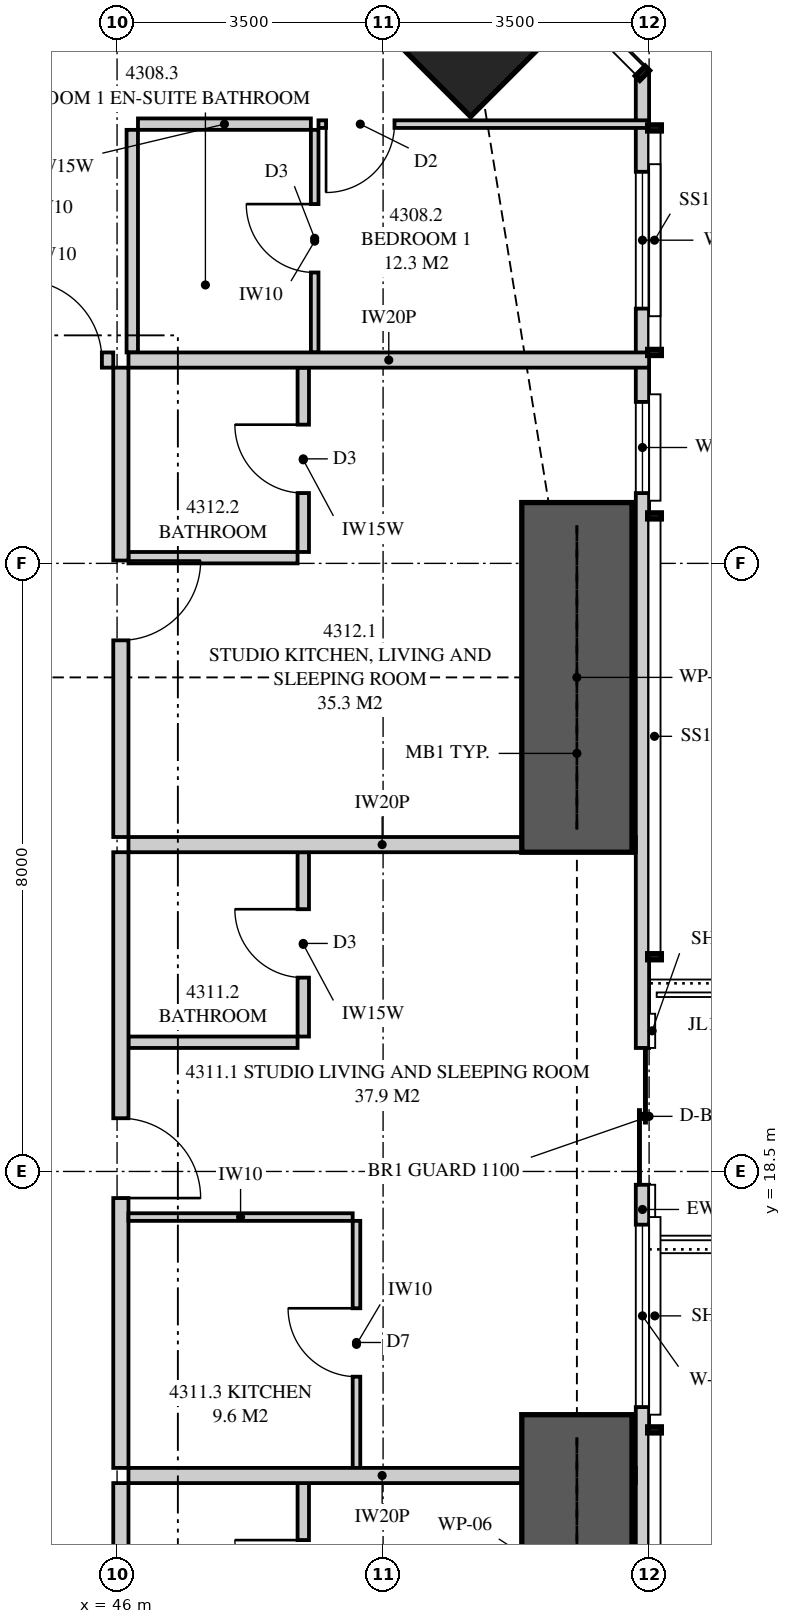
"""IFC4 building model, lengths in metres.
Left out: names, types, materials, properties, quantities, classifications, styles, units other than length and angle.
Written with IfcOpenShell. Run it as: python <this file> out.ifc"""

import sys

from ifc_helpers import new_model, si_unit, direction, frame, frame_2d, origin, origin_2d, place, context, subcontext, project, spatial, polyline, rectangle, outline, extrude, element, fill, save


model = new_model("IFC4")
c1 = context("Model", 3, precision=1e-05, world=origin(), true_north=direction((0.0, 1.0)))
c2 = subcontext(c1, "Body", "Model", "MODEL_VIEW")
j1 = project(units=[si_unit("LENGTHUNIT", "METRE"), si_unit("PLANEANGLEUNIT", "RADIAN")], contexts=[c1])
p1 = place(None, origin())
s1 = spatial("IfcSite", under=j1, at=p1, CompositionType="ELEMENT")
p2 = place(p1, origin())
s2 = spatial("IfcBuilding", under=s1, at=p2, CompositionType="ELEMENT")
p3 = place(p2, frame((0.0, 0.0, 161.05)))
s3 = spatial("IfcBuildingStorey", under=s2, at=p3, CompositionType="ELEMENT", Elevation=161.05)
p4 = place(p3, frame((50.652, 33.652, 0.0), z_axis=(0.0, 0.0, 1.0), x_axis=(0.707106781187, 0.707106781187, 0.0)))
e1 = element("IfcColumn", 1, at=p4, inside=s3, PredefinedType="COLUMN", context=c2, shape_type="SweptSolid", body=[
    extrude(rectangle(XDim=1.8, YDim=1.8, at=origin_2d()), origin(), (0.0, 0.0, 1.0), 3.35),
])
p5 = place(p3, frame((52.913, 3.051, 0.0), z_axis=(0.0, 0.0, 1.0), x_axis=(0.0, 1.0, 0.0)))
e2 = element("IfcWall", 2, at=p5, inside=s3, PredefinedType="SOLIDWALL", context=c2, shape_type="SweptSolid", body=[
    extrude(outline(polyline([(0.0, 0.0), (29.897, 0.0), (29.897, 3.11), (22.167, 3.11), (22.167, 2.15), (22.074, 2.15), (22.074, 3.11), (21.949, 3.11), (21.949, 2.15), (9.949, 2.15), (9.949, 3.11), (9.847, 3.11), (9.847, 2.15), (9.706, 2.15), (9.706, 3.11), (0.0, 3.11), (0.0, 0.0)])), frame((0.0, 0.087, 0.0), z_axis=(0.0, -1.0, 0.0), x_axis=(1.0, 0.0, 0.0)), (0.0, 0.0, 1.0), 0.175),
])
p6 = place(p5, frame((1.797, 0.0, 0.4)))
e3 = element("IfcOpeningElement", 3, at=p6, cuts=e2, PredefinedType="OPENING", context=c2, shape_type="SweptSolid", body=[
    extrude(rectangle(XDim=1.8, YDim=1.7, at=frame_2d((0.9, 0.85))), frame((0.0, 0.097, 0.0), z_axis=(0.0, -1.0, 0.0), x_axis=(1.0, 0.0, 0.0)), (0.0, 0.0, 1.0), 0.195),
])
p7 = place(p5, frame((5.149, 0.0, 0.4)))
e4 = element("IfcOpeningElement", 4, at=p7, cuts=e2, PredefinedType="OPENING", context=c2, shape_type="SweptSolid", body=[
    extrude(rectangle(XDim=2.4, YDim=1.7, at=frame_2d((1.2, 0.85))), frame((0.0, 0.097, 0.0), z_axis=(0.0, -1.0, 0.0), x_axis=(1.0, 0.0, 0.0)), (0.0, 0.0, 1.0), 0.195),
])
p8 = place(p5, frame((15.274, 0.0, 0.0)))
e5 = element("IfcOpeningElement", 5, at=p8, cuts=e2, PredefinedType="OPENING", context=c2, shape_type="SweptSolid", body=[
    extrude(rectangle(XDim=1.8, YDim=2.1, at=frame_2d((0.9, 1.05))), frame((0.0, 0.097, 0.0), z_axis=(0.0, -1.0, 0.0), x_axis=(1.0, 0.0, 0.0)), (0.0, 0.0, 1.0), 0.195),
])
p9 = place(p5, frame((12.349, 0.0, 0.4)))
e6 = element("IfcOpeningElement", 6, at=p9, cuts=e2, PredefinedType="OPENING", context=c2, shape_type="SweptSolid", body=[
    extrude(rectangle(XDim=2.4, YDim=1.7, at=frame_2d((1.2, 0.85))), frame((0.0, 0.097, 0.0), z_axis=(0.0, -1.0, 0.0), x_axis=(1.0, 0.0, 0.0)), (0.0, 0.0, 1.0), 0.195),
])
p10 = place(p5, frame((24.373, 0.0, 0.4)))
e7 = element("IfcOpeningElement", 7, at=p10, cuts=e2, PredefinedType="OPENING", context=c2, shape_type="SweptSolid", body=[
    extrude(rectangle(XDim=1.2, YDim=1.7, at=frame_2d((0.6, 0.85))), frame((0.0, 0.097, 0.0), z_axis=(0.0, -1.0, 0.0), x_axis=(1.0, 0.0, 0.0)), (0.0, 0.0, 1.0), 0.195),
])
p11 = place(p5, frame((26.801, 0.0, 0.4)))
e8 = element("IfcOpeningElement", 8, at=p11, cuts=e2, PredefinedType="OPENING", context=c2, shape_type="SweptSolid", body=[
    extrude(rectangle(XDim=1.8, YDim=1.7, at=frame_2d((0.9, 0.85))), frame((0.0, 0.097, 0.0), z_axis=(0.0, -1.0, 0.0), x_axis=(1.0, 0.0, 0.0)), (0.0, 0.0, 1.0), 0.195),
])
p12 = place(p3, frame((42.05, 29.175, 0.0), z_axis=(0.0, 0.0, 1.0), x_axis=(1.0, 0.0, 0.0)))
e9 = element("IfcWall", 9, at=p12, inside=s3, PredefinedType="PARTITIONING", context=c2, shape_type="SweptSolid", body=[
    extrude(outline(polyline([(0.0, 0.0), (3.9, 0.0), (3.9, 3.11), (1.037, 3.11), (1.037, 2.541), (0.363, 2.541), (0.363, 3.11), (0.0, 3.11), (0.0, 0.0)])), frame((0.0, 0.1, 0.0), z_axis=(0.0, -1.0, 0.0), x_axis=(1.0, 0.0, 0.0)), (0.0, 0.0, 1.0), 0.2),
])
p13 = place(p12, frame((2.7, 0.0, 0.0)))
e10 = element("IfcOpeningElement", 10, at=p13, cuts=e9, PredefinedType="OPENING", context=c2, shape_type="SweptSolid", body=[
    extrude(rectangle(XDim=1.05, YDim=2.2, at=frame_2d((0.525, 1.1))), frame((0.0, 0.11, 0.0), z_axis=(0.0, -1.0, 0.0), x_axis=(1.0, 0.0, 0.0)), (0.0, 0.0, 1.0), 0.22),
])
p14 = place(p3, frame((48.6, 32.204, 0.0), z_axis=(0.0, 0.0, 1.0), x_axis=(0.0, -1.0, 0.0)))
e11 = element("IfcWall", 11, at=p14, inside=s3, PredefinedType="PARTITIONING", context=c2, shape_type="SweptSolid", body=[
    extrude(rectangle(XDim=2.929, YDim=0.1, at=frame_2d((1.464, 0.0))), origin(), (0.0, 0.0, 1.0), 3.11),
])
p15 = place(p14, frame((0.977, 0.0, 0.0)))
e12 = element("IfcOpeningElement", 12, at=p15, cuts=e11, PredefinedType="OPENING", context=c2, shape_type="SweptSolid", body=[
    extrude(rectangle(XDim=0.9, YDim=2.1, at=frame_2d((0.45, 1.05))), frame((0.0, 0.06, 0.0), z_axis=(0.0, -1.0, 0.0), x_axis=(1.0, 0.0, 0.0)), (0.0, 0.0, 1.0), 0.12),
])
p16 = place(p3, frame((48.65, 32.279, 0.0), z_axis=(0.0, 0.0, 1.0), x_axis=(1.0, 0.0, 0.0)))
e13 = element("IfcWall", 13, at=p16, inside=s3, PredefinedType="PARTITIONING", context=c2, shape_type="SweptSolid", body=[
    extrude(outline(polyline([(0.0, 0.0), (4.35, 0.0), (4.35, 3.11), (3.094, 3.11), (3.094, 2.15), (1.352, 2.15), (1.352, 3.11), (0.0, 3.11), (0.0, 0.0)])), frame((0.0, 0.05, 0.0), z_axis=(0.0, -1.0, 0.0), x_axis=(1.0, 0.0, 0.0)), (0.0, 0.0, 1.0), 0.1),
])
p17 = place(p16, frame((0.1, 0.0, 0.0)))
e14 = element("IfcOpeningElement", 14, at=p17, cuts=e13, PredefinedType="OPENING", context=c2, shape_type="SweptSolid", body=[
    extrude(rectangle(XDim=0.9, YDim=2.1, at=frame_2d((0.45, 1.05))), frame((0.0, 0.06, 0.0), z_axis=(0.0, -1.0, 0.0), x_axis=(1.0, 0.0, 0.0)), (0.0, 0.0, 1.0), 0.12),
])
p18 = place(p3, frame((46.275, 32.279, 0.0), z_axis=(0.0, 0.0, 1.0), x_axis=(1.0, 0.0, 0.0)))
e15 = element("IfcWall", 15, at=p18, inside=s3, PredefinedType="PLUMBINGWALL", context=c2, shape_type="SweptSolid", body=[
    extrude(rectangle(XDim=2.275, YDim=0.15, at=frame_2d((1.138, 0.0))), origin(), (0.0, 0.0, 1.0), 3.11),
])
p19 = place(p3, frame((46.2, 32.204, 0.0), z_axis=(0.0, 0.0, 1.0), x_axis=(0.0, -1.0, 0.0)))
e16 = element("IfcWall", 16, at=p19, inside=s3, PredefinedType="PLUMBINGWALL", context=c2, shape_type="SweptSolid", body=[
    extrude(rectangle(XDim=2.929, YDim=0.15, at=frame_2d((1.464, 0.0))), origin(), (0.0, 0.0, 1.0), 3.11),
])
p20 = place(p3, frame((46.15, 29.175, 0.0), z_axis=(0.0, 0.0, 1.0), x_axis=(1.0, 0.0, 0.0)))
e17 = element("IfcWall", 17, at=p20, inside=s3, PredefinedType="PARTITIONING", context=c2, shape_type="SweptSolid", body=[
    extrude(outline(polyline([(0.0, 0.0), (6.85, 0.0), (6.85, 3.11), (6.147, 3.11), (6.147, 2.15), (4.303, 2.15), (4.303, 3.11), (0.0, 3.11), (0.0, 0.0)])), frame((0.0, 0.1, 0.0), z_axis=(0.0, -1.0, 0.0), x_axis=(1.0, 0.0, 0.0)), (0.0, 0.0, 1.0), 0.2),
])
p21 = place(p3, frame((52.825, 14.5, 0.0), z_axis=(0.0, 0.0, 1.0), x_axis=(-1.0, 0.0, 0.0)))
e18 = element("IfcWall", 18, at=p21, inside=s3, PredefinedType="PARTITIONING", context=c2, shape_type="SweptSolid", body=[
    extrude(outline(polyline([(0.529, 2.15), (0.0, 2.15), (0.0, 0.0), (0.529, 0.0), (0.529, 0.29), (1.021, 0.29), (1.021, 0.0), (6.675, 0.0), (6.675, 3.11), (1.685, 3.11), (1.685, 2.15), (1.021, 2.15), (1.021, 1.86), (0.529, 1.86), (0.529, 2.15)])), frame((0.0, 0.1, 0.0), z_axis=(0.0, -1.0, 0.0), x_axis=(1.0, 0.0, 0.0)), (0.0, 0.0, 1.0), 0.2),
])
p22 = place(p3, frame((46.05, 7.925, 0.0), z_axis=(0.0, 0.0, 1.0), x_axis=(0.0, 1.0, 0.0)))
e19 = element("IfcWall", 19, at=p22, inside=s3, PredefinedType="PARTITIONING", context=c2, shape_type="SweptSolid", body=[
    extrude(outline(polyline([(0.0, 0.0), (6.475, 0.0), (6.475, 3.11), (5.412, 3.11), (5.412, 2.541), (4.738, 2.541), (4.738, 3.11), (0.0, 3.11), (0.0, 0.0)])), frame((0.0, 0.1, 0.0), z_axis=(0.0, -1.0, 0.0), x_axis=(1.0, 0.0, 0.0)), (0.0, 0.0, 1.0), 0.2),
])
p23 = place(p22, frame((2.738, 0.0, 0.0)))
e20 = element("IfcOpeningElement", 20, at=p23, cuts=e19, PredefinedType="OPENING", context=c2, shape_type="SweptSolid", body=[
    extrude(rectangle(XDim=1.05, YDim=2.2, at=frame_2d((0.525, 1.1))), frame((0.0, 0.11, 0.0), z_axis=(0.0, -1.0, 0.0), x_axis=(1.0, 0.0, 0.0)), (0.0, 0.0, 1.0), 0.22),
])
p24 = place(p3, frame((48.45, 11.975, 0.0), z_axis=(0.0, 0.0, 1.0), x_axis=(0.0, 1.0, 0.0)))
e21 = element("IfcWall", 21, at=p24, inside=s3, PredefinedType="PLUMBINGWALL", context=c2, shape_type="SweptSolid", body=[
    extrude(outline(polyline([(0.0, 0.0), (2.425, 0.0), (2.425, 3.11), (1.337, 3.11), (1.337, 2.541), (0.713, 2.541), (0.713, 3.11), (0.0, 3.11), (0.0, 0.0)])), frame((0.0, 0.075, 0.0), z_axis=(0.0, -1.0, 0.0), x_axis=(1.0, 0.0, 0.0)), (0.0, 0.0, 1.0), 0.15),
])
p25 = place(p24, frame((0.775, 0.0, 0.0)))
e22 = element("IfcOpeningElement", 22, at=p25, cuts=e21, PredefinedType="OPENING", context=c2, shape_type="SweptSolid", body=[
    extrude(rectangle(XDim=0.9, YDim=2.1, at=frame_2d((0.45, 1.05))), frame((0.0, 0.085, 0.0), z_axis=(0.0, -1.0, 0.0), x_axis=(1.0, 0.0, 0.0)), (0.0, 0.0, 1.0), 0.17),
])
p26 = place(p3, frame((52.825, 22.8, 0.0), z_axis=(0.0, 0.0, 1.0), x_axis=(-1.0, 0.0, 0.0)))
e23 = element("IfcWall", 23, at=p26, inside=s3, PredefinedType="PARTITIONING", context=c2, shape_type="SweptSolid", body=[
    extrude(outline(polyline([(0.0, 0.0), (6.675, 0.0), (6.675, 3.11), (1.685, 3.11), (1.685, 2.15), (0.0, 2.15), (0.0, 3.11), (0.0, 0.0)])), frame((0.0, 0.1, 0.0), z_axis=(0.0, -1.0, 0.0), x_axis=(1.0, 0.0, 0.0)), (0.0, 0.0, 1.0), 0.2),
])
p27 = place(p3, frame((46.05, 14.6, 0.0), z_axis=(0.0, 0.0, 1.0), x_axis=(0.0, 1.0, 0.0)))
e24 = element("IfcWall", 24, at=p27, inside=s3, PredefinedType="PARTITIONING", context=c2, shape_type="SweptSolid", body=[
    extrude(rectangle(XDim=8.1, YDim=0.2, at=frame_2d((4.05, 0.0))), origin(), (0.0, 0.0, 1.0), 3.11),
])
p28 = place(p27, frame((3.55, 0.0, 0.0)))
e25 = element("IfcOpeningElement", 25, at=p28, cuts=e24, PredefinedType="OPENING", context=c2, shape_type="SweptSolid", body=[
    extrude(rectangle(XDim=1.05, YDim=2.2, at=frame_2d((0.525, 1.1))), frame((0.0, 0.11, 0.0), z_axis=(0.0, -1.0, 0.0), x_axis=(1.0, 0.0, 0.0)), (0.0, 0.0, 1.0), 0.22),
])
p29 = place(p3, frame((48.45, 20.275, 0.0), z_axis=(0.0, 0.0, 1.0), x_axis=(0.0, 1.0, 0.0)))
e26 = element("IfcWall", 26, at=p29, inside=s3, PredefinedType="PLUMBINGWALL", context=c2, shape_type="SweptSolid", body=[
    extrude(rectangle(XDim=2.425, YDim=0.15, at=frame_2d((1.212, 0.0))), origin(), (0.0, 0.0, 1.0), 3.11),
])
p30 = place(p29, frame((0.775, 0.0, 0.0)))
e27 = element("IfcOpeningElement", 27, at=p30, cuts=e26, PredefinedType="OPENING", context=c2, shape_type="SweptSolid", body=[
    extrude(rectangle(XDim=0.9, YDim=2.1, at=frame_2d((0.45, 1.05))), frame((0.0, 0.085, 0.0), z_axis=(0.0, -1.0, 0.0), x_axis=(1.0, 0.0, 0.0)), (0.0, 0.0, 1.0), 0.17),
])
p31 = place(p3, frame((48.375, 20.2, 0.0), z_axis=(0.0, 0.0, 1.0), x_axis=(-1.0, 0.0, 0.0)))
e28 = element("IfcWall", 28, at=p31, inside=s3, PredefinedType="PLUMBINGWALL", context=c2, shape_type="SweptSolid", body=[
    extrude(rectangle(XDim=2.225, YDim=0.15, at=frame_2d((1.113, 0.0))), origin(), (0.0, 0.0, 1.0), 3.11),
])
p32 = place(p3, frame((49.15, 14.6, 0.0), z_axis=(0.0, 0.0, 1.0), x_axis=(0.0, 1.0, 0.0)))
e29 = element("IfcWall", 29, at=p32, inside=s3, PredefinedType="PARTITIONING", context=c2, shape_type="SweptSolid", body=[
    extrude(rectangle(XDim=3.25, YDim=0.1, at=frame_2d((1.625, 0.0))), origin(), (0.0, 0.0, 1.0), 3.11),
])
p33 = place(p32, frame((1.2, 0.0, 0.0)))
e30 = element("IfcOpeningElement", 30, at=p33, cuts=e29, PredefinedType="OPENING", context=c2, shape_type="SweptSolid", body=[
    extrude(rectangle(XDim=0.9, YDim=2.1, at=frame_2d((0.45, 1.05))), frame((0.0, 0.06, 0.0), z_axis=(0.0, -1.0, 0.0), x_axis=(1.0, 0.0, 0.0)), (0.0, 0.0, 1.0), 0.12),
])
p34 = place(p3, frame((49.1, 17.9, 0.0), z_axis=(0.0, 0.0, 1.0), x_axis=(-1.0, 0.0, 0.0)))
e31 = element("IfcWall", 31, at=p34, inside=s3, PredefinedType="PARTITIONING", context=c2, shape_type="SweptSolid", body=[
    extrude(rectangle(XDim=2.95, YDim=0.1, at=frame_2d((1.475, 0.0))), origin(), (0.0, 0.0, 1.0), 3.11),
])
p35 = place(p3, frame((46.05, 22.9, 0.0), z_axis=(0.0, 0.0, 1.0), x_axis=(0.0, 1.0, 0.0)))
e32 = element("IfcWall", 32, at=p35, inside=s3, PredefinedType="PARTITIONING", context=c2, shape_type="SweptSolid", body=[
    extrude(outline(polyline([(0.0, 0.0), (6.175, 0.0), (6.175, 3.11), (2.437, 3.11), (2.437, 2.541), (1.763, 2.541), (1.763, 3.11), (0.0, 3.11), (0.0, 0.0)])), frame((0.0, 0.1, 0.0), z_axis=(0.0, -1.0, 0.0), x_axis=(1.0, 0.0, 0.0)), (0.0, 0.0, 1.0), 0.2),
])
p36 = place(p35, frame((2.587, 0.0, 0.0)))
e33 = element("IfcOpeningElement", 33, at=p36, cuts=e32, PredefinedType="OPENING", context=c2, shape_type="SweptSolid", body=[
    extrude(rectangle(XDim=1.05, YDim=2.2, at=frame_2d((0.525, 1.1))), frame((0.0, 0.11, 0.0), z_axis=(0.0, -1.0, 0.0), x_axis=(1.0, 0.0, 0.0)), (0.0, 0.0, 1.0), 0.22),
])
p37 = place(p3, frame((48.45, 26.65, 0.0), z_axis=(0.0, 0.0, 1.0), x_axis=(0.0, 1.0, 0.0)))
e34 = element("IfcWall", 34, at=p37, inside=s3, PredefinedType="PLUMBINGWALL", context=c2, shape_type="SweptSolid", body=[
    extrude(rectangle(XDim=2.425, YDim=0.15, at=frame_2d((1.212, 0.0))), origin(), (0.0, 0.0, 1.0), 3.11),
])
p38 = place(p37, frame((0.775, 0.0, 0.0)))
e35 = element("IfcOpeningElement", 35, at=p38, cuts=e34, PredefinedType="OPENING", context=c2, shape_type="SweptSolid", body=[
    extrude(rectangle(XDim=0.9, YDim=2.1, at=frame_2d((0.45, 1.05))), frame((0.0, 0.085, 0.0), z_axis=(0.0, -1.0, 0.0), x_axis=(1.0, 0.0, 0.0)), (0.0, 0.0, 1.0), 0.17),
])
p39 = place(p3, frame((48.375, 26.575, 0.0), z_axis=(0.0, 0.0, 1.0), x_axis=(-1.0, 0.0, 0.0)))
e36 = element("IfcWall", 36, at=p39, inside=s3, PredefinedType="PLUMBINGWALL", context=c2, shape_type="SweptSolid", body=[
    extrude(rectangle(XDim=2.225, YDim=0.15, at=frame_2d((1.113, 0.0))), origin(), (0.0, 0.0, 1.0), 3.11),
])
for number, where, z_axis, x_axis in (
    (37, (52.05, 10.7, 0.0), (0.0, 0.0, 1.0), (0.0, 1.0, 0.0)),
    (38, (52.05, 22.7, 0.0), (0.0, 0.0, 1.0), (0.0, 1.0, 0.0)),
):
    element("IfcWall", number, at=place(p3, frame(where, z_axis=z_axis, x_axis=x_axis)), inside=s3, PredefinedType="SHEAR", context=c2, shape_type="SweptSolid", body=[
        extrude(rectangle(XDim=4.6, YDim=1.45, at=frame_2d((2.3, 0.0))), origin(), (0.0, 0.0, 1.0), 3.35),
    ])
p40 = place(p8, origin())
e39 = element("IfcDoor", 39, at=p40, inside=s3, OperationType="SLIDING_TO_LEFT", PredefinedType="DOOR", context=c2, shape_type="SweptSolid", body=[
    extrude(rectangle(XDim=1.8, YDim=2.1, at=frame_2d((0.9, 1.05))), frame((0.0, 0.025, 0.0), z_axis=(0.0, -1.0, 0.0), x_axis=(1.0, 0.0, 0.0)), (0.0, 0.0, 1.0), 0.05),
])
fill(e5, e39)
p41 = place(p9, origin())
e40 = element("IfcWindow", 40, at=p41, inside=s3, PartitioningType="SINGLE_PANEL", PredefinedType="WINDOW", context=c2, shape_type="SweptSolid", body=[
    extrude(rectangle(XDim=2.4, YDim=1.7, at=frame_2d((1.2, 0.85))), frame((0.0, 0.03, 0.0), z_axis=(0.0, -1.0, 0.0), x_axis=(1.0, 0.0, 0.0)), (0.0, 0.0, 1.0), 0.06),
])
fill(e6, e40)
p42 = place(p10, origin())
e41 = element("IfcWindow", 41, at=p42, inside=s3, PartitioningType="SINGLE_PANEL", PredefinedType="WINDOW", context=c2, shape_type="SweptSolid", body=[
    extrude(rectangle(XDim=1.2, YDim=1.7, at=frame_2d((0.6, 0.85))), frame((0.0, 0.03, 0.0), z_axis=(0.0, -1.0, 0.0), x_axis=(1.0, 0.0, 0.0)), (0.0, 0.0, 1.0), 0.06),
])
fill(e7, e41)
p43 = place(p11, origin())
e42 = element("IfcWindow", 42, at=p43, inside=s3, PartitioningType="SINGLE_PANEL", PredefinedType="WINDOW", context=c2, shape_type="SweptSolid", body=[
    extrude(rectangle(XDim=1.8, YDim=1.7, at=frame_2d((0.9, 0.85))), frame((0.0, 0.03, 0.0), z_axis=(0.0, -1.0, 0.0), x_axis=(1.0, 0.0, 0.0)), (0.0, 0.0, 1.0), 0.06),
])
fill(e8, e42)
p44 = place(p13, origin())
e43 = element("IfcDoor", 43, at=p44, inside=s3, OperationType="SINGLE_SWING_LEFT", PredefinedType="DOOR", context=c2, shape_type="SweptSolid", body=[
    extrude(rectangle(XDim=1.05, YDim=2.2, at=frame_2d((0.525, 1.1))), frame((0.0, 0.025, 0.0), z_axis=(0.0, -1.0, 0.0), x_axis=(1.0, 0.0, 0.0)), (0.0, 0.0, 1.0), 0.05),
])
fill(e10, e43)
p45 = place(p17, frame((0.9, 0.0, 0.0), z_axis=(0.0, 0.0, 1.0), x_axis=(-1.0, 0.0, 0.0)))
e44 = element("IfcDoor", 44, at=p45, inside=s3, OperationType="SINGLE_SWING_RIGHT", PredefinedType="DOOR", context=c2, shape_type="SweptSolid", body=[
    extrude(rectangle(XDim=0.9, YDim=2.1, at=frame_2d((0.45, 1.05))), frame((0.0, 0.025, 0.0), z_axis=(0.0, -1.0, 0.0), x_axis=(1.0, 0.0, 0.0)), (0.0, 0.0, 1.0), 0.05),
])
fill(e14, e44)
p46 = place(p15, frame((0.9, 0.0, 0.0), z_axis=(0.0, 0.0, 1.0), x_axis=(-1.0, 0.0, 0.0)))
e45 = element("IfcDoor", 45, at=p46, inside=s3, OperationType="SINGLE_SWING_RIGHT", PredefinedType="DOOR", context=c2, shape_type="SweptSolid", body=[
    extrude(rectangle(XDim=0.9, YDim=2.1, at=frame_2d((0.45, 1.05))), frame((0.0, 0.025, 0.0), z_axis=(0.0, -1.0, 0.0), x_axis=(1.0, 0.0, 0.0)), (0.0, 0.0, 1.0), 0.05),
])
fill(e12, e45)
p47 = place(p25, origin())
e46 = element("IfcDoor", 46, at=p47, inside=s3, OperationType="SINGLE_SWING_RIGHT", PredefinedType="DOOR", context=c2, shape_type="SweptSolid", body=[
    extrude(rectangle(XDim=0.9, YDim=2.1, at=frame_2d((0.45, 1.05))), frame((0.0, 0.025, 0.0), z_axis=(0.0, -1.0, 0.0), x_axis=(1.0, 0.0, 0.0)), (0.0, 0.0, 1.0), 0.05),
])
fill(e22, e46)
p48 = place(p28, frame((1.05, 0.0, 0.0), z_axis=(0.0, 0.0, 1.0), x_axis=(-1.0, 0.0, 0.0)))
e47 = element("IfcDoor", 47, at=p48, inside=s3, OperationType="SINGLE_SWING_RIGHT", PredefinedType="DOOR", context=c2, shape_type="SweptSolid", body=[
    extrude(rectangle(XDim=1.05, YDim=2.2, at=frame_2d((0.525, 1.1))), frame((0.0, 0.025, 0.0), z_axis=(0.0, -1.0, 0.0), x_axis=(1.0, 0.0, 0.0)), (0.0, 0.0, 1.0), 0.05),
])
fill(e25, e47)
p49 = place(p30, origin())
e48 = element("IfcDoor", 48, at=p49, inside=s3, OperationType="SINGLE_SWING_RIGHT", PredefinedType="DOOR", context=c2, shape_type="SweptSolid", body=[
    extrude(rectangle(XDim=0.9, YDim=2.1, at=frame_2d((0.45, 1.05))), frame((0.0, 0.025, 0.0), z_axis=(0.0, -1.0, 0.0), x_axis=(1.0, 0.0, 0.0)), (0.0, 0.0, 1.0), 0.05),
])
fill(e27, e48)
p50 = place(p33, origin())
e49 = element("IfcDoor", 49, at=p50, inside=s3, OperationType="SINGLE_SWING_RIGHT", PredefinedType="DOOR", context=c2, shape_type="SweptSolid", body=[
    extrude(rectangle(XDim=0.9, YDim=2.1, at=frame_2d((0.45, 1.05))), frame((0.0, 0.025, 0.0), z_axis=(0.0, -1.0, 0.0), x_axis=(1.0, 0.0, 0.0)), (0.0, 0.0, 1.0), 0.05),
])
fill(e30, e49)
p51 = place(p36, frame((1.05, 0.0, 0.0), z_axis=(0.0, 0.0, 1.0), x_axis=(-1.0, 0.0, 0.0)))
e50 = element("IfcDoor", 50, at=p51, inside=s3, OperationType="SINGLE_SWING_LEFT", PredefinedType="DOOR", context=c2, shape_type="SweptSolid", body=[
    extrude(rectangle(XDim=1.05, YDim=2.2, at=frame_2d((0.525, 1.1))), frame((0.0, 0.025, 0.0), z_axis=(0.0, -1.0, 0.0), x_axis=(1.0, 0.0, 0.0)), (0.0, 0.0, 1.0), 0.05),
])
fill(e33, e50)
p52 = place(p38, origin())
e51 = element("IfcDoor", 51, at=p52, inside=s3, OperationType="SINGLE_SWING_RIGHT", PredefinedType="DOOR", context=c2, shape_type="SweptSolid", body=[
    extrude(rectangle(XDim=0.9, YDim=2.1, at=frame_2d((0.45, 1.05))), frame((0.0, 0.025, 0.0), z_axis=(0.0, -1.0, 0.0), x_axis=(1.0, 0.0, 0.0)), (0.0, 0.0, 1.0), 0.05),
])
fill(e35, e51)
save(model, sys.argv[1])
